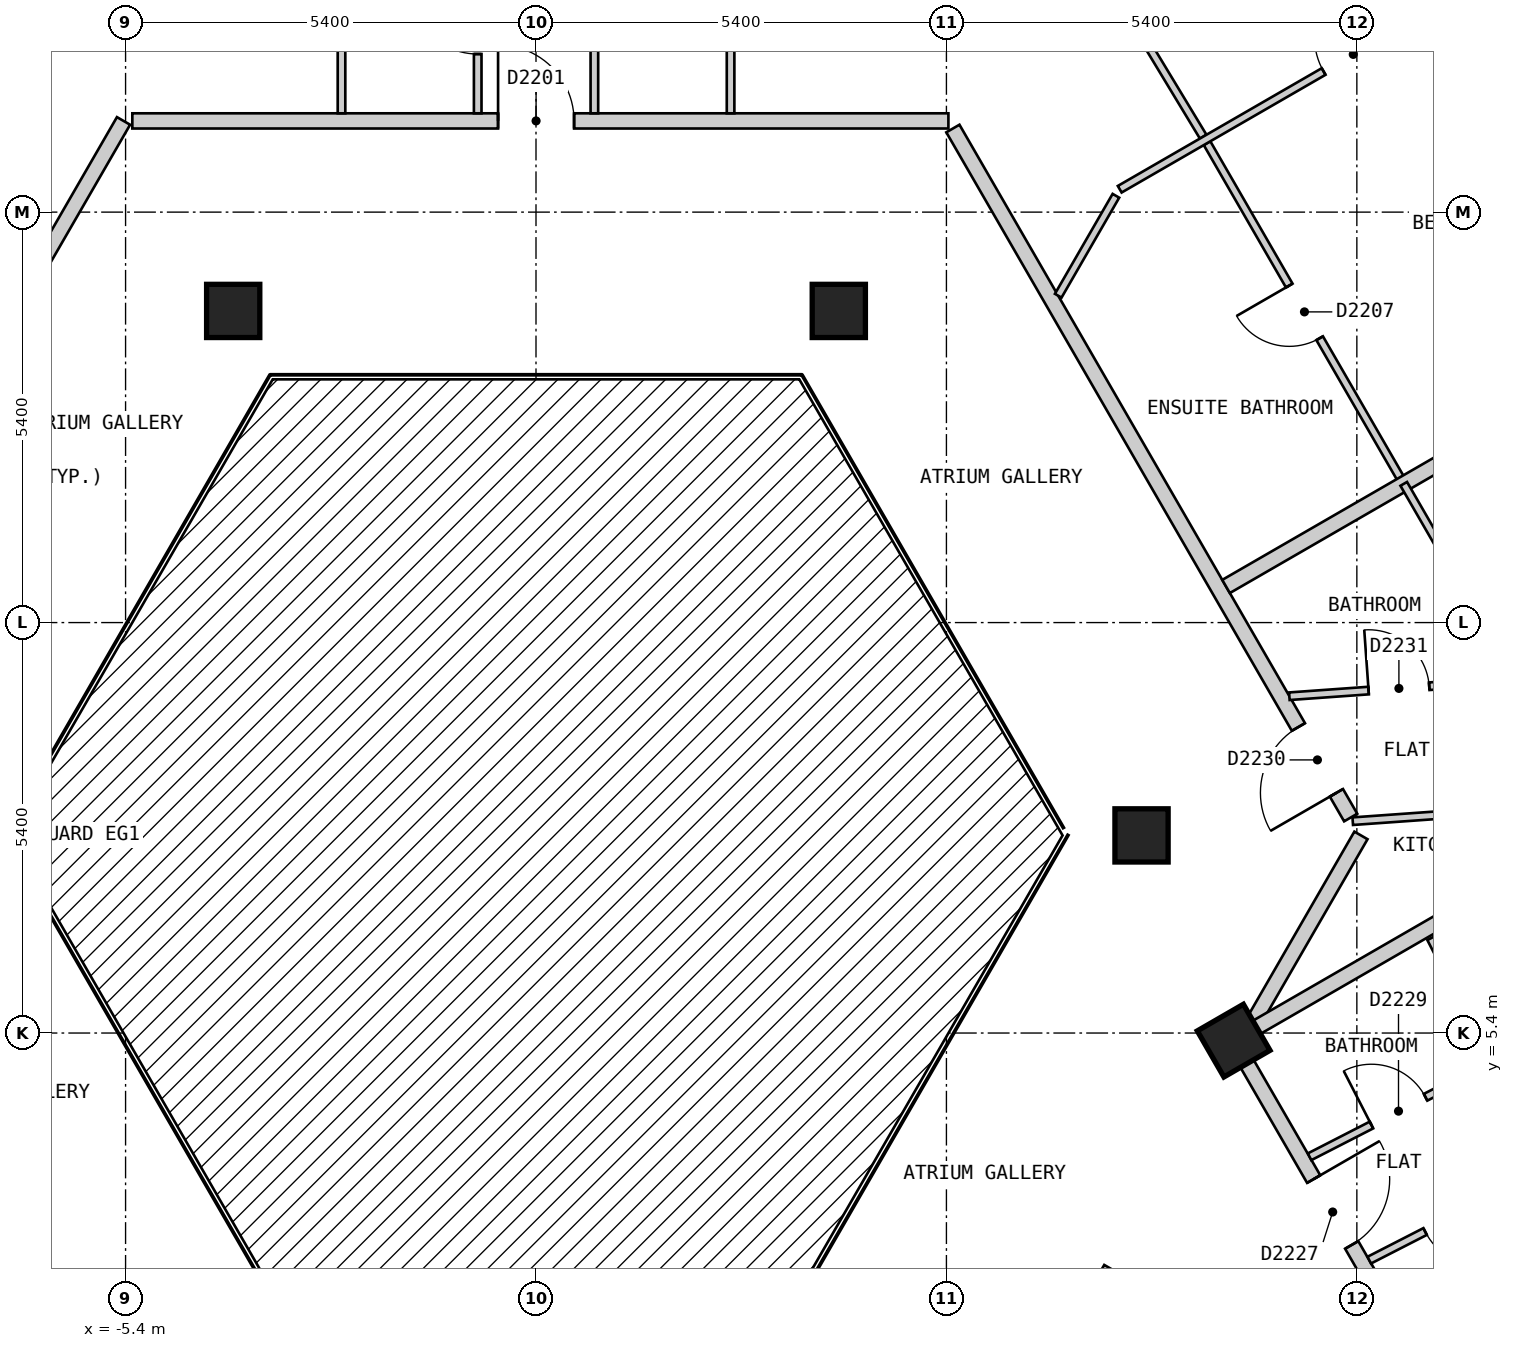
"""IFC4 building model, lengths in metres.
Left out: names, types, materials, properties, quantities, classifications, styles, units other than length and angle.
Written with IfcOpenShell. Run it as: python <this file> out.ifc"""

import sys

from ifc_helpers import new_model, si_unit, direction, frame, frame_2d, origin, origin_2d, place, context, subcontext, project, spatial, rectangle, extrude, element, fill, save


model = new_model("IFC4")
c1 = context("Model", 3, precision=1e-05, world=origin(), true_north=direction((0.0, 1.0)))
c2 = subcontext(c1, "Body", "Model", "MODEL_VIEW")
j1 = project(units=[si_unit("LENGTHUNIT", "METRE"), si_unit("PLANEANGLEUNIT", "RADIAN")], contexts=[c1])
p1 = place(None, origin())
s1 = spatial("IfcSite", under=j1, at=p1, CompositionType="ELEMENT")
p2 = place(p1, origin())
s2 = spatial("IfcBuilding", under=s1, at=p2, CompositionType="ELEMENT")
p3 = place(p2, frame((0.0, 0.0, 223.8)))
s3 = spatial("IfcBuildingStorey", under=s2, at=p3, CompositionType="ELEMENT", Elevation=223.8)
for number, where, z_axis, x_axis in (
    (1, (9.179, 5.3, 0.0), (0.0, 0.0, 1.0), (-0.5, 0.866, 0.0)),
    (2, (7.967, 8.0, 0.0), (0.0, 0.0, 1.0), (1.0, 0.0, 0.0)),
    (3, (3.984, 14.9, 0.0), (0.0, 0.0, 1.0), (1.0, 0.0, 0.0)),
    (4, (-3.984, 14.9, 0.0), (0.0, 0.0, 1.0), (1.0, 0.0, 0.0)),
):
    element("IfcColumn", number, at=place(p3, frame(where, z_axis=z_axis, x_axis=x_axis)), inside=s3, PredefinedType="COLUMN", context=c2, shape_type="SweptSolid", body=[
        extrude(rectangle(XDim=0.7, YDim=0.7, at=origin_2d()), origin(), (0.0, 0.0, 1.0), 3.0),
    ])
p4 = place(p3, frame((9.238, 5.2, 0.0), z_axis=(0.0, 0.0, 1.0), x_axis=(0.500025705601, -0.86601056214, 0.0)))
e5 = element("IfcWall", 5, at=p4, inside=s3, PredefinedType="PARTITIONING", context=c2, shape_type="SweptSolid", body=[
    extrude(rectangle(XDim=7.735, YDim=0.2, at=frame_2d((3.868, 0.0))), origin(), (0.0, 0.0, 1.0), 2.7),
])
p5 = place(p4, frame((6.898, 0.0, 0.0)))
e6 = element("IfcOpeningElement", 6, at=p5, cuts=e5, PredefinedType="OPENING", context=c2, shape_type="SweptSolid", body=[
    extrude(rectangle(XDim=0.8, YDim=2.1, at=frame_2d((0.4, 1.05))), frame((0.0, 0.11, 0.0), z_axis=(0.0, -1.0, 0.0), x_axis=(1.0, 0.0, 0.0)), (0.0, 0.0, 1.0), 0.22),
])
p6 = place(p4, frame((1.988, 0.0, 0.0)))
e7 = element("IfcOpeningElement", 7, at=p6, cuts=e5, PredefinedType="OPENING", context=c2, shape_type="SweptSolid", body=[
    extrude(rectangle(XDim=1.0, YDim=2.1, at=frame_2d((0.5, 1.05))), frame((0.0, 0.11, 0.0), z_axis=(0.0, -1.0, 0.0), x_axis=(1.0, 0.0, 0.0)), (0.0, 0.0, 1.0), 0.22),
])
p7 = place(p3, frame((5.485, 17.3, 0.0), z_axis=(0.0, 0.0, 1.0), x_axis=(0.500017221754, -0.866015460572, 0.0)))
e8 = element("IfcWall", 8, at=p7, inside=s3, PredefinedType="PARTITIONING", context=c2, shape_type="SweptSolid", body=[
    extrude(rectangle(XDim=10.468, YDim=0.2, at=frame_2d((5.234, 0.0))), origin(), (0.0, 0.0, 1.0), 2.7),
])
p8 = place(p7, frame((9.092, 0.0, 0.0)))
e9 = element("IfcOpeningElement", 9, at=p8, cuts=e8, PredefinedType="OPENING", context=c2, shape_type="SweptSolid", body=[
    extrude(rectangle(XDim=1.0, YDim=2.1, at=frame_2d((0.5, 1.05))), frame((0.0, 0.11, 0.0), z_axis=(0.0, -1.0, 0.0), x_axis=(1.0, 0.0, 0.0)), (0.0, 0.0, 1.0), 0.22),
])
p9 = place(p3, frame((-5.311, 17.4, 0.0), z_axis=(0.0, 0.0, 1.0), x_axis=(1.0, 0.0, 0.0)))
e10 = element("IfcWall", 10, at=p9, inside=s3, PredefinedType="PARTITIONING", context=c2, shape_type="SweptSolid", body=[
    extrude(rectangle(XDim=10.737, YDim=0.2, at=frame_2d((5.369, 0.0))), origin(), (0.0, 0.0, 1.0), 2.7),
])
p10 = place(p9, frame((4.812, 0.0, 0.0)))
e11 = element("IfcOpeningElement", 11, at=p10, cuts=e10, PredefinedType="OPENING", context=c2, shape_type="SweptSolid", body=[
    extrude(rectangle(XDim=1.0, YDim=2.1, at=frame_2d((0.5, 1.05))), frame((0.0, 0.11, 0.0), z_axis=(0.0, -1.0, 0.0), x_axis=(1.0, 0.0, 0.0)), (0.0, 0.0, 1.0), 0.22),
])
p11 = place(p3, frame((6.928, 1.2, 0.0), z_axis=(0.0, 0.0, 1.0), x_axis=(0.500255167297, 0.865878032746, 0.0)))
e12 = element("IfcWall", 12, at=p11, inside=s3, PredefinedType="PARTITIONING", context=c2, shape_type="SweptSolid", body=[
    extrude(rectangle(XDim=1.269, YDim=0.2, at=frame_2d((0.635, 0.0))), origin(), (0.0, 0.0, 1.0), 2.7),
])
p12 = place(p3, frame((9.354, 5.401, 0.0), z_axis=(0.0, 0.0, 1.0), x_axis=(0.499849222119, 0.866112437936, 0.0)))
e13 = element("IfcWall", 13, at=p12, inside=s3, PredefinedType="PARTITIONING", context=c2, shape_type="SweptSolid", body=[
    extrude(rectangle(XDim=3.001, YDim=0.2, at=frame_2d((1.5, 0.0))), origin(), (0.0, 0.0, 1.0), 2.7),
])
p13 = place(p3, frame((-10.854, 8.0, 0.0), z_axis=(0.0, 0.0, 1.0), x_axis=(0.499997637144, 0.866026767976, 0.0)))
e14 = element("IfcWall", 14, at=p13, inside=s3, PredefinedType="PARTITIONING", context=c2, shape_type="SweptSolid", body=[
    extrude(rectangle(XDim=10.854, YDim=0.2, at=frame_2d((5.427, 0.0))), origin(), (0.0, 0.0, 1.0), 2.7),
])
p14 = place(p3, frame((7.033, 20.077, 0.0), z_axis=(0.0, 0.0, 1.0), x_axis=(0.517730137343, -0.855543981854, 0.0)))
e15 = element("IfcWall", 15, at=p14, inside=s3, PredefinedType="PARTITIONING", context=c2, shape_type="SweptSolid", body=[
    extrude(rectangle(XDim=3.371, YDim=0.1, at=frame_2d((1.685, 0.0))), origin(), (0.0, 0.0, 1.0), 2.7),
])
p15 = place(p3, frame((8.829, 17.107, 0.0), z_axis=(0.0, 0.0, 1.0), x_axis=(0.500035512416, -0.866004899711, 0.0)))
e16 = element("IfcWall", 16, at=p15, inside=s3, PredefinedType="PARTITIONING", context=c2, shape_type="SweptSolid", body=[
    extrude(rectangle(XDim=5.175, YDim=0.1, at=frame_2d((2.588, 0.0))), origin(), (0.0, 0.0, 1.0), 2.7),
])
p16 = place(p15, frame((2.163, 0.0, 0.0)))
e17 = element("IfcOpeningElement", 17, at=p16, cuts=e16, PredefinedType="OPENING", context=c2, shape_type="SweptSolid", body=[
    extrude(rectangle(XDim=0.8, YDim=2.1, at=frame_2d((0.4, 1.05))), frame((0.0, 0.06, 0.0), z_axis=(0.0, -1.0, 0.0), x_axis=(1.0, 0.0, 0.0)), (0.0, 0.0, 1.0), 0.12),
])
p17 = place(p3, frame((11.772, 6.646, 0.0), z_axis=(0.0, 0.0, 1.0), x_axis=(0.456175983405, -0.889889584254, 0.0)))
e18 = element("IfcWall", 18, at=p17, inside=s3, PredefinedType="PARTITIONING", context=c2, shape_type="SweptSolid", body=[
    extrude(rectangle(XDim=3.348, YDim=0.1, at=frame_2d((1.674, 0.0))), origin(), (0.0, 0.0, 1.0), 2.7),
])
p18 = place(p3, frame((-2.559, 20.17, 0.0), z_axis=(0.0, 0.0, 1.0), x_axis=(0.0, -1.0, 0.0)))
e19 = element("IfcWall", 19, at=p18, inside=s3, PredefinedType="PARTITIONING", context=c2, shape_type="SweptSolid", body=[
    extrude(rectangle(XDim=2.67, YDim=0.1, at=frame_2d((1.335, 0.0))), origin(), (0.0, 0.0, 1.0), 2.7),
])
p19 = place(p3, frame((2.56, 20.03, 0.0), z_axis=(0.0, 0.0, 1.0), x_axis=(0.0, -1.0, 0.0)))
e20 = element("IfcWall", 20, at=p19, inside=s3, PredefinedType="PARTITIONING", context=c2, shape_type="SweptSolid", body=[
    extrude(rectangle(XDim=2.53, YDim=0.1, at=frame_2d((1.265, 0.0))), origin(), (0.0, 0.0, 1.0), 2.7),
])
p20 = place(p3, frame((6.871, 15.1, 0.0), z_axis=(0.0, 0.0, 1.0), x_axis=(0.499805980977, 0.866137391745, 0.0)))
e21 = element("IfcWall", 21, at=p20, inside=s3, PredefinedType="PARTITIONING", context=c2, shape_type="SweptSolid", body=[
    extrude(rectangle(XDim=1.518, YDim=0.1, at=frame_2d((0.759, 0.0))), origin(), (0.0, 0.0, 1.0), 2.7),
])
p21 = place(p3, frame((0.768, 17.5, 0.0), z_axis=(0.0, 0.0, 1.0), x_axis=(0.0, 1.0, 0.0)))
e22 = element("IfcWall", 22, at=p21, inside=s3, PredefinedType="PARTITIONING", context=c2, shape_type="SweptSolid", body=[
    extrude(rectangle(XDim=2.51, YDim=0.1, at=frame_2d((1.255, 0.0))), origin(), (0.0, 0.0, 1.0), 2.7),
])
p22 = place(p21, frame((0.83, 0.0, 0.0)))
e23 = element("IfcOpeningElement", 23, at=p22, cuts=e22, PredefinedType="OPENING", context=c2, shape_type="SweptSolid", body=[
    extrude(rectangle(XDim=0.8, YDim=2.1, at=frame_2d((0.4, 1.05))), frame((0.0, 0.06, 0.0), z_axis=(0.0, -1.0, 0.0), x_axis=(1.0, 0.0, 0.0)), (0.0, 0.0, 1.0), 0.12),
])
p23 = place(p3, frame((-0.767, 17.5, 0.0), z_axis=(0.0, 0.0, 1.0), x_axis=(0.0, 1.0, 0.0)))
e24 = element("IfcWall", 24, at=p23, inside=s3, PredefinedType="PARTITIONING", context=c2, shape_type="SweptSolid", body=[
    extrude(rectangle(XDim=2.559, YDim=0.1, at=frame_2d((1.28, 0.0))), origin(), (0.0, 0.0, 1.0), 2.7),
])
p24 = place(p23, frame((0.78, 0.0, 0.0)))
e25 = element("IfcOpeningElement", 25, at=p24, cuts=e24, PredefinedType="OPENING", context=c2, shape_type="SweptSolid", body=[
    extrude(rectangle(XDim=0.9, YDim=2.1, at=frame_2d((0.45, 1.05))), frame((0.0, 0.06, 0.0), z_axis=(0.0, -1.0, 0.0), x_axis=(1.0, 0.0, 0.0)), (0.0, 0.0, 1.0), 0.12),
])
p25 = place(p3, frame((10.178, 3.772, 0.0), z_axis=(0.0, 0.0, 1.0), x_axis=(0.889732071959, 0.456483121405, 0.0)))
e26 = element("IfcWall", 26, at=p25, inside=s3, PredefinedType="PARTITIONING", context=c2, shape_type="SweptSolid", body=[
    extrude(rectangle(XDim=2.679, YDim=0.1, at=frame_2d((1.34, 0.0))), origin(), (0.0, 0.0, 1.0), 2.7),
])
p26 = place(p25, frame((0.915, 0.0, 0.0)))
e27 = element("IfcOpeningElement", 27, at=p26, cuts=e26, PredefinedType="OPENING", context=c2, shape_type="SweptSolid", body=[
    extrude(rectangle(XDim=0.8, YDim=2.1, at=frame_2d((0.4, 1.05))), frame((0.0, 0.06, 0.0), z_axis=(0.0, -1.0, 0.0), x_axis=(1.0, 0.0, 0.0)), (0.0, 0.0, 1.0), 0.12),
])
p27 = place(p3, frame((10.963, 2.412, 0.0), z_axis=(0.0, 0.0, 1.0), x_axis=(0.889943997558, 0.456069820543, 0.0)))
e28 = element("IfcWall", 28, at=p27, inside=s3, PredefinedType="PARTITIONING", context=c2, shape_type="SweptSolid", body=[
    extrude(rectangle(XDim=2.651, YDim=0.1, at=frame_2d((1.325, 0.0))), origin(), (0.0, 0.0, 1.0), 2.7),
])
p28 = place(p27, frame((0.826, 0.0, 0.0)))
e29 = element("IfcOpeningElement", 29, at=p28, cuts=e28, PredefinedType="OPENING", context=c2, shape_type="SweptSolid", body=[
    extrude(rectangle(XDim=0.9, YDim=2.1, at=frame_2d((0.45, 1.05))), frame((0.0, 0.06, 0.0), z_axis=(0.0, -1.0, 0.0), x_axis=(1.0, 0.0, 0.0)), (0.0, 0.0, 1.0), 0.12),
])
p29 = place(p3, frame((7.68, 16.501, 0.0), z_axis=(0.0, 0.0, 1.0), x_axis=(0.86602149507, 0.500006770031, 0.0)))
e30 = element("IfcWall", 30, at=p29, inside=s3, PredefinedType="PARTITIONING", context=c2, shape_type="SweptSolid", body=[
    extrude(rectangle(XDim=5.798, YDim=0.1, at=frame_2d((2.899, 0.0))), origin(), (0.0, 0.0, 1.0), 2.7),
])
p30 = place(p29, frame((3.098, 0.0, 0.0)))
e31 = element("IfcOpeningElement", 31, at=p30, cuts=e30, PredefinedType="OPENING", context=c2, shape_type="SweptSolid", body=[
    extrude(rectangle(XDim=0.9, YDim=2.1, at=frame_2d((0.45, 1.05))), frame((0.0, 0.06, 0.0), z_axis=(0.0, -1.0, 0.0), x_axis=(1.0, 0.0, 0.0)), (0.0, 0.0, 1.0), 0.12),
])
p31 = place(p3, frame((10.746, 8.187, 0.0), z_axis=(0.0, 0.0, 1.0), x_axis=(0.997477310687, 0.070986017387, 0.0)))
e32 = element("IfcWall", 32, at=p31, inside=s3, PredefinedType="PARTITIONING", context=c2, shape_type="SweptSolid", body=[
    extrude(rectangle(XDim=3.058, YDim=0.1, at=frame_2d((1.529, 0.0))), origin(), (0.0, 0.0, 1.0), 2.7),
])
p32 = place(p31, frame((1.079, 0.0, 0.0)))
e33 = element("IfcOpeningElement", 33, at=p32, cuts=e32, PredefinedType="OPENING", context=c2, shape_type="SweptSolid", body=[
    extrude(rectangle(XDim=0.9, YDim=2.1, at=frame_2d((0.45, 1.05))), frame((0.0, 0.06, 0.0), z_axis=(0.0, -1.0, 0.0), x_axis=(1.0, 0.0, 0.0)), (0.0, 0.0, 1.0), 0.12),
])
p33 = place(p3, frame((9.912, 9.831, 0.0), z_axis=(0.0, 0.0, 1.0), x_axis=(0.997459937941, 0.071229714326, 0.0)))
e34 = element("IfcWall", 34, at=p33, inside=s3, PredefinedType="PARTITIONING", context=c2, shape_type="SweptSolid", body=[
    extrude(rectangle(XDim=3.002, YDim=0.1, at=frame_2d((1.501, 0.0))), origin(), (0.0, 0.0, 1.0), 2.7),
])
p34 = place(p33, frame((1.045, 0.0, 0.0)))
e35 = element("IfcOpeningElement", 35, at=p34, cuts=e34, PredefinedType="OPENING", context=c2, shape_type="SweptSolid", body=[
    extrude(rectangle(XDim=0.8, YDim=2.1, at=frame_2d((0.4, 1.05))), frame((0.0, 0.06, 0.0), z_axis=(0.0, -1.0, 0.0), x_axis=(1.0, 0.0, 0.0)), (0.0, 0.0, 1.0), 0.12),
])
p35 = place(p3, frame((9.457, 5.461, 0.0), z_axis=(0.0, 0.0, 1.0), x_axis=(0.866043818878, 0.499968102766, 0.0)))
e36 = element("IfcWall", 36, at=p35, inside=s3, PredefinedType="PARTITIONING", context=c2, shape_type="SweptSolid", body=[
    extrude(rectangle(XDim=9.779, YDim=0.2, at=frame_2d((4.89, 0.0))), origin(), (0.0, 0.0, 1.0), 2.7),
])
p36 = place(p3, frame((9.079, 11.275, 0.0), z_axis=(0.0, 0.0, 1.0), x_axis=(0.866001485781, 0.500041424909, 0.0)))
e37 = element("IfcWall", 37, at=p36, inside=s3, PredefinedType="PARTITIONING", context=c2, shape_type="SweptSolid", body=[
    extrude(rectangle(XDim=7.2, YDim=0.2, at=frame_2d((3.6, 0.0))), origin(), (0.0, 0.0, 1.0), 2.7),
])
p37 = place(p3, frame((11.417, 12.625, 0.0), z_axis=(0.0, 0.0, 1.0), x_axis=(0.500055103712, -0.865993587304, 0.0)))
e38 = element("IfcWall", 38, at=p37, inside=s3, PredefinedType="PARTITIONING", context=c2, shape_type="SweptSolid", body=[
    extrude(rectangle(XDim=2.944, YDim=0.1, at=frame_2d((1.472, 0.0))), origin(), (0.0, 0.0, 1.0), 2.7),
])
p38 = place(p10, origin())
e39 = element("IfcDoor", 39, at=p38, inside=s3, OperationType="SINGLE_SWING_LEFT", PredefinedType="DOOR", context=c2, shape_type="SweptSolid", body=[
    extrude(rectangle(XDim=1.0, YDim=2.1, at=frame_2d((0.5, 1.05))), frame((0.0, 0.025, 0.0), z_axis=(0.0, -1.0, 0.0), x_axis=(1.0, 0.0, 0.0)), (0.0, 0.0, 1.0), 0.05),
])
fill(e11, e39)
p39 = place(p24, origin())
e40 = element("IfcDoor", 40, at=p39, inside=s3, OperationType="SINGLE_SWING_RIGHT", PredefinedType="DOOR", context=c2, shape_type="SweptSolid", body=[
    extrude(rectangle(XDim=0.9, YDim=2.1, at=frame_2d((0.45, 1.05))), frame((0.0, 0.025, 0.0), z_axis=(0.0, -1.0, 0.0), x_axis=(1.0, 0.0, 0.0)), (0.0, 0.0, 1.0), 0.05),
])
fill(e25, e40)
p40 = place(p30, origin())
e41 = element("IfcDoor", 41, at=p40, inside=s3, OperationType="SINGLE_SWING_RIGHT", PredefinedType="DOOR", context=c2, shape_type="SweptSolid", body=[
    extrude(rectangle(XDim=0.9, YDim=2.1, at=frame_2d((0.45, 1.05))), frame((0.0, 0.025, 0.0), z_axis=(0.0, -1.0, 0.0), x_axis=(1.0, 0.0, 0.0)), (0.0, 0.0, 1.0), 0.05),
])
fill(e31, e41)
p41 = place(p16, origin())
e42 = element("IfcDoor", 42, at=p41, inside=s3, OperationType="SINGLE_SWING_LEFT", PredefinedType="DOOR", context=c2, shape_type="SweptSolid", body=[
    extrude(rectangle(XDim=0.8, YDim=2.1, at=frame_2d((0.4, 1.05))), frame((0.0, 0.025, 0.0), z_axis=(0.0, -1.0, 0.0), x_axis=(1.0, 0.0, 0.0)), (0.0, 0.0, 1.0), 0.05),
])
fill(e17, e42)
p42 = place(p6, origin())
e43 = element("IfcDoor", 43, at=p42, inside=s3, OperationType="SINGLE_SWING_LEFT", PredefinedType="DOOR", context=c2, shape_type="SweptSolid", body=[
    extrude(rectangle(XDim=1.0, YDim=2.1, at=frame_2d((0.5, 1.05))), frame((0.0, 0.025, 0.0), z_axis=(0.0, -1.0, 0.0), x_axis=(1.0, 0.0, 0.0)), (0.0, 0.0, 1.0), 0.05),
])
fill(e7, e43)
p43 = place(p28, origin())
e44 = element("IfcDoor", 44, at=p43, inside=s3, OperationType="SINGLE_SWING_RIGHT", PredefinedType="DOOR", context=c2, shape_type="SweptSolid", body=[
    extrude(rectangle(XDim=0.9, YDim=2.1, at=frame_2d((0.45, 1.05))), frame((0.0, 0.025, 0.0), z_axis=(0.0, -1.0, 0.0), x_axis=(1.0, 0.0, 0.0)), (0.0, 0.0, 1.0), 0.05),
])
fill(e29, e44)
p44 = place(p26, origin())
e45 = element("IfcDoor", 45, at=p44, inside=s3, OperationType="SINGLE_SWING_LEFT", PredefinedType="DOOR", context=c2, shape_type="SweptSolid", body=[
    extrude(rectangle(XDim=0.8, YDim=2.1, at=frame_2d((0.4, 1.05))), frame((0.0, 0.025, 0.0), z_axis=(0.0, -1.0, 0.0), x_axis=(1.0, 0.0, 0.0)), (0.0, 0.0, 1.0), 0.05),
])
fill(e27, e45)
p45 = place(p8, origin())
e46 = element("IfcDoor", 46, at=p45, inside=s3, OperationType="SINGLE_SWING_RIGHT", PredefinedType="DOOR", context=c2, shape_type="SweptSolid", body=[
    extrude(rectangle(XDim=1.0, YDim=2.1, at=frame_2d((0.5, 1.05))), frame((0.0, 0.025, 0.0), z_axis=(0.0, -1.0, 0.0), x_axis=(1.0, 0.0, 0.0)), (0.0, 0.0, 1.0), 0.05),
])
fill(e9, e46)
p46 = place(p34, origin())
e47 = element("IfcDoor", 47, at=p46, inside=s3, OperationType="SINGLE_SWING_LEFT", PredefinedType="DOOR", context=c2, shape_type="SweptSolid", body=[
    extrude(rectangle(XDim=0.8, YDim=2.1, at=frame_2d((0.4, 1.05))), frame((0.0, 0.025, 0.0), z_axis=(0.0, -1.0, 0.0), x_axis=(1.0, 0.0, 0.0)), (0.0, 0.0, 1.0), 0.05),
])
fill(e35, e47)
save(model, sys.argv[1])
